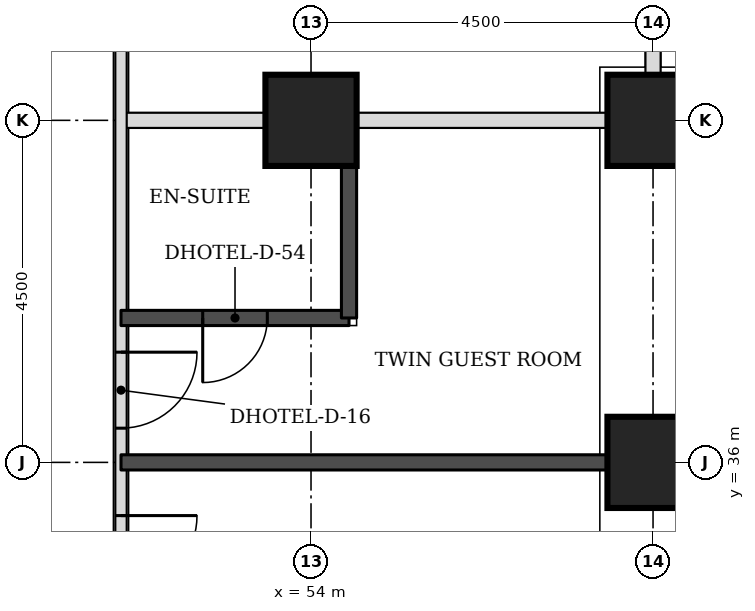
"""IFC4 building model, lengths in metres.
Left out: names, types, materials, properties, quantities, classifications, styles, units other than length and angle.
Written with IfcOpenShell. Run it as: python <this file> out.ifc"""

import sys

from ifc_helpers import new_model, si_unit, direction, frame, frame_2d, origin, origin_2d, place, context, subcontext, project, spatial, rectangle, extrude, element, fill, save


model = new_model("IFC4")
c1 = context("Model", 3, precision=1e-05, world=origin(), true_north=direction((0.0, 1.0)))
c2 = subcontext(c1, "Body", "Model", "MODEL_VIEW")
j1 = project(units=[si_unit("LENGTHUNIT", "METRE"), si_unit("PLANEANGLEUNIT", "RADIAN")], contexts=[c1])
p1 = place(None, origin())
s1 = spatial("IfcSite", under=j1, at=p1, CompositionType="ELEMENT")
p2 = place(p1, origin())
s2 = spatial("IfcBuilding", under=s1, at=p2, CompositionType="ELEMENT")
p3 = place(p2, frame((0.0, 0.0, 59.4)))
s3 = spatial("IfcBuildingStorey", under=s2, at=p3, CompositionType="ELEMENT", Elevation=59.4)
for number, where, z_axis, x_axis in (
    (1, (58.5, 36.0, 0.0), (0.0, 0.0, 1.0), (1.0, 0.0, 0.0)),
    (2, (54.0, 40.5, 0.0), (0.0, 0.0, 1.0), (1.0, 0.0, 0.0)),
    (3, (58.5, 40.5, 0.0), (0.0, 0.0, 1.0), (1.0, 0.0, 0.0)),
):
    element("IfcColumn", number, at=place(p3, frame(where, z_axis=z_axis, x_axis=x_axis)), inside=s3, PredefinedType="COLUMN", context=c2, shape_type="SweptSolid", body=[
        extrude(rectangle(XDim=1.2, YDim=1.2, at=origin_2d()), origin(), (0.0, 0.0, 1.0), 3.3),
    ])
p4 = place(p3, frame((51.5, 40.5, 0.0), z_axis=(0.0, 0.0, 1.0), x_axis=(1.0, 0.0, 0.0)))
e4 = element("IfcWall", 4, at=p4, inside=s3, PredefinedType="PARTITIONING", context=c2, shape_type="SweptSolid", body=[
    extrude(rectangle(XDim=6.4, YDim=0.2, at=frame_2d((3.2, 0.0))), origin(), (0.0, 0.0, 1.0), 2.33),
])
p5 = place(p3, frame((58.5, 41.1, 0.0), z_axis=(0.0, 0.0, 1.0), x_axis=(0.0, 1.0, 0.0)))
e5 = element("IfcWall", 5, at=p5, inside=s3, PredefinedType="PARTITIONING", context=c2, shape_type="SweptSolid", body=[
    extrude(rectangle(XDim=6.4, YDim=0.2, at=frame_2d((3.2, 0.0))), origin(), (0.0, 0.0, 1.0), 3.08),
])
p6 = place(p3, frame((51.5, 25.15, 0.0), z_axis=(0.0, 0.0, 1.0), x_axis=(0.0, 1.0, 0.0)))
e6 = element("IfcWall", 6, at=p6, inside=s3, PredefinedType="PARTITIONING", context=c2, shape_type="SweptSolid", body=[
    extrude(rectangle(XDim=22.35, YDim=0.15, at=frame_2d((11.175, 0.0))), origin(), (0.0, 0.0, 1.0), 3.08),
])
p7 = place(p6, frame((0.347, 0.0, 0.0)))
e7 = element("IfcOpeningElement", 7, at=p7, cuts=e6, PredefinedType="OPENING", context=c2, shape_type="SweptSolid", body=[
    extrude(rectangle(XDim=1.0, YDim=2.1, at=frame_2d((0.5, 1.05))), frame((0.0, 0.085, 0.0), z_axis=(0.0, -1.0, 0.0), x_axis=(1.0, 0.0, 0.0)), (0.0, 0.0, 1.0), 0.17),
])
p8 = place(p6, frame((2.3, 0.0, 0.0)))
e8 = element("IfcOpeningElement", 8, at=p8, cuts=e6, PredefinedType="OPENING", context=c2, shape_type="SweptSolid", body=[
    extrude(rectangle(XDim=1.0, YDim=2.1, at=frame_2d((0.5, 1.05))), frame((0.0, 0.085, 0.0), z_axis=(0.0, -1.0, 0.0), x_axis=(1.0, 0.0, 0.0)), (0.0, 0.0, 1.0), 0.17),
])
p9 = place(p6, frame((9.15, 0.0, 0.0)))
e9 = element("IfcOpeningElement", 9, at=p9, cuts=e6, PredefinedType="OPENING", context=c2, shape_type="SweptSolid", body=[
    extrude(rectangle(XDim=1.0, YDim=2.1, at=frame_2d((0.5, 1.05))), frame((0.0, 0.085, 0.0), z_axis=(0.0, -1.0, 0.0), x_axis=(1.0, 0.0, 0.0)), (0.0, 0.0, 1.0), 0.17),
])
p10 = place(p6, frame((11.3, 0.0, 0.0)))
e10 = element("IfcOpeningElement", 10, at=p10, cuts=e6, PredefinedType="OPENING", context=c2, shape_type="SweptSolid", body=[
    extrude(rectangle(XDim=1.0, YDim=2.1, at=frame_2d((0.5, 1.05))), frame((0.0, 0.085, 0.0), z_axis=(0.0, -1.0, 0.0), x_axis=(1.0, 0.0, 0.0)), (0.0, 0.0, 1.0), 0.17),
])
p11 = place(p6, frame((18.4, 0.0, 0.0)))
e11 = element("IfcOpeningElement", 11, at=p11, cuts=e6, PredefinedType="OPENING", context=c2, shape_type="SweptSolid", body=[
    extrude(rectangle(XDim=0.9, YDim=2.1, at=frame_2d((0.45, 1.05))), frame((0.0, 0.085, 0.0), z_axis=(0.0, -1.0, 0.0), x_axis=(1.0, 0.0, 0.0)), (0.0, 0.0, 1.0), 0.17),
])
p12 = place(p3, frame((51.5, 36.0, 0.0), z_axis=(0.0, 0.0, 1.0), x_axis=(1.0, 0.0, 0.0)))
e12 = element("IfcWall", 12, at=p12, inside=s3, PredefinedType="SOLIDWALL", context=c2, shape_type="SweptSolid", body=[
    extrude(rectangle(XDim=6.4, YDim=0.2, at=frame_2d((3.2, 0.0))), origin(), (0.0, 0.0, 1.0), 3.08),
])
p13 = place(p3, frame((51.5, 37.9, 0.0), z_axis=(0.0, 0.0, 1.0), x_axis=(1.0, 0.0, 0.0)))
e13 = element("IfcWall", 13, at=p13, inside=s3, PredefinedType="SOLIDWALL", context=c2, shape_type="SweptSolid", body=[
    extrude(rectangle(XDim=3.0, YDim=0.2, at=frame_2d((1.5, 0.0))), origin(), (0.0, 0.0, 1.0), 3.08),
])
p14 = place(p13, frame((1.075, 0.0, 0.0)))
e14 = element("IfcOpeningElement", 14, at=p14, cuts=e13, PredefinedType="OPENING", context=c2, shape_type="SweptSolid", body=[
    extrude(rectangle(XDim=0.85, YDim=2.1, at=frame_2d((0.425, 1.05))), frame((0.0, 0.11, 0.0), z_axis=(0.0, -1.0, 0.0), x_axis=(1.0, 0.0, 0.0)), (0.0, 0.0, 1.0), 0.22),
])
p15 = place(p3, frame((54.5, 37.9, 0.0), z_axis=(0.0, 0.0, 1.0), x_axis=(0.0, 1.0, 0.0)))
e15 = element("IfcWall", 15, at=p15, inside=s3, PredefinedType="SOLIDWALL", context=c2, shape_type="SweptSolid", body=[
    extrude(rectangle(XDim=2.6, YDim=0.2, at=frame_2d((1.3, 0.0))), origin(), (0.0, 0.0, 1.0), 3.08),
])
p16 = place(p9, frame((1.0, 0.0, 0.0), z_axis=(0.0, 0.0, 1.0), x_axis=(-1.0, 0.0, 0.0)))
e16 = element("IfcDoor", 16, at=p16, inside=s3, OperationType="SINGLE_SWING_LEFT", PredefinedType="DOOR", context=c2, shape_type="SweptSolid", body=[
    extrude(rectangle(XDim=1.0, YDim=2.1, at=frame_2d((0.5, 1.05))), frame((0.0, 0.025, 0.0), z_axis=(0.0, -1.0, 0.0), x_axis=(1.0, 0.0, 0.0)), (0.0, 0.0, 1.0), 0.05),
])
fill(e9, e16)
p17 = place(p10, frame((1.0, 0.0, 0.0), z_axis=(0.0, 0.0, 1.0), x_axis=(-1.0, 0.0, 0.0)))
e17 = element("IfcDoor", 17, at=p17, inside=s3, OperationType="SINGLE_SWING_LEFT", PredefinedType="DOOR", context=c2, shape_type="SweptSolid", body=[
    extrude(rectangle(XDim=1.0, YDim=2.1, at=frame_2d((0.5, 1.05))), frame((0.0, 0.025, 0.0), z_axis=(0.0, -1.0, 0.0), x_axis=(1.0, 0.0, 0.0)), (0.0, 0.0, 1.0), 0.05),
])
fill(e10, e17)
p18 = place(p14, frame((0.85, 0.0, 0.0), z_axis=(0.0, 0.0, 1.0), x_axis=(-1.0, 0.0, 0.0)))
e18 = element("IfcDoor", 18, at=p18, inside=s3, OperationType="SINGLE_SWING_RIGHT", PredefinedType="DOOR", context=c2, shape_type="SweptSolid", body=[
    extrude(rectangle(XDim=0.85, YDim=2.1, at=frame_2d((0.425, 1.05))), frame((0.0, 0.025, 0.0), z_axis=(0.0, -1.0, 0.0), x_axis=(1.0, 0.0, 0.0)), (0.0, 0.0, 1.0), 0.05),
])
fill(e14, e18)
save(model, sys.argv[1])
